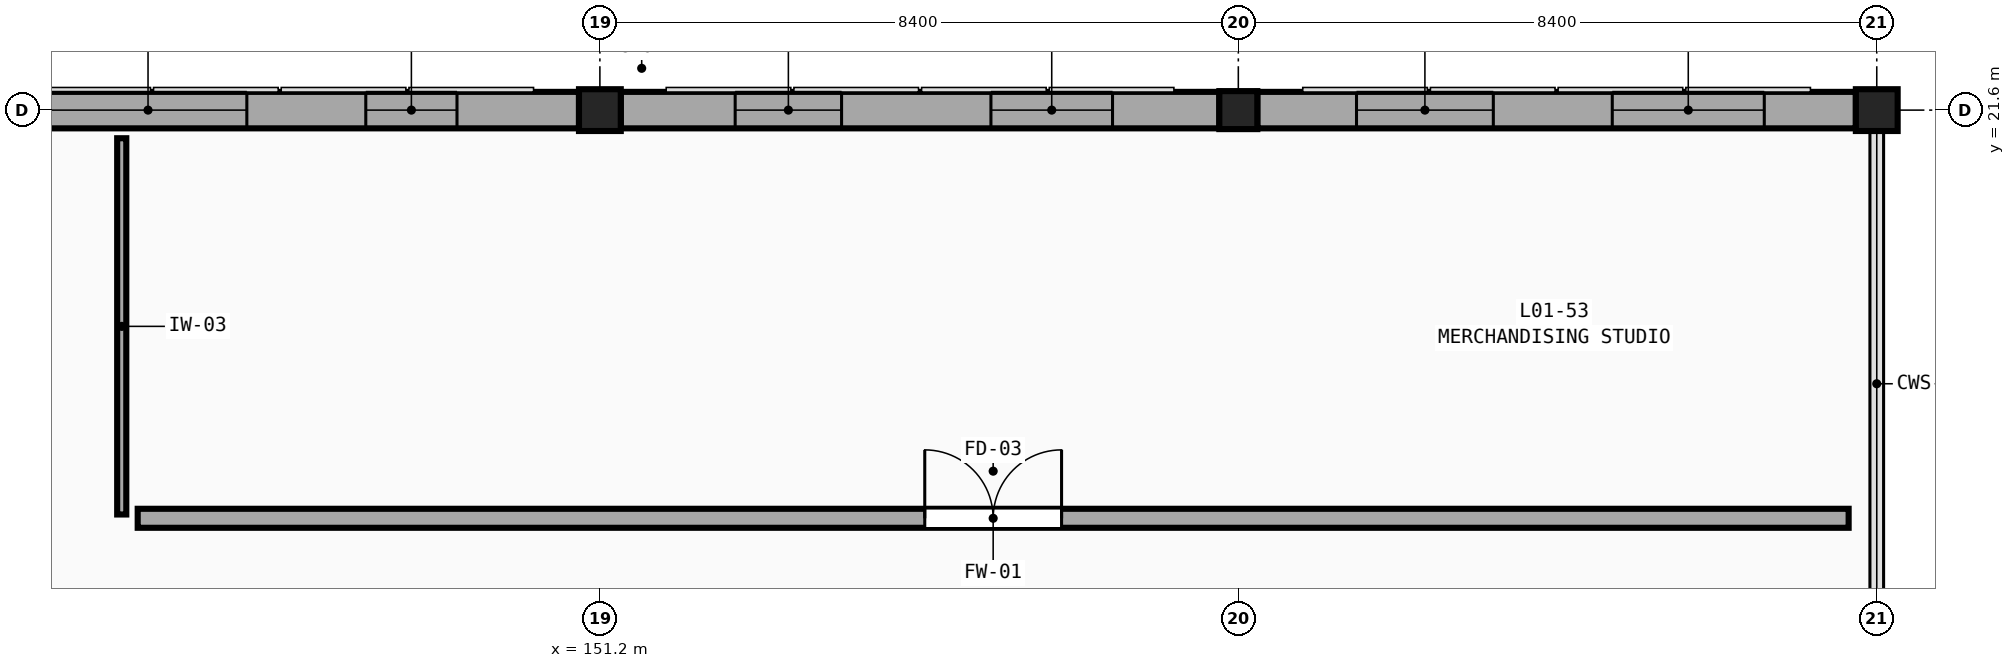
"""IFC4 building model, lengths in metres.
Left out: names, types, materials, properties, quantities, classifications, styles, units other than length and angle.
Written with IfcOpenShell. Run it as: python <this file> out.ifc"""

import sys

from ifc_helpers import new_model, si_unit, direction, frame, frame_2d, origin, origin_2d, place, context, subcontext, project, spatial, rectangle, extrude, element, fill, save


model = new_model("IFC4")
c1 = context("Model", 3, precision=1e-05, world=origin(), true_north=direction((0.0, 1.0)))
c2 = subcontext(c1, "Body", "Model", "MODEL_VIEW")
j1 = project(units=[si_unit("LENGTHUNIT", "METRE"), si_unit("PLANEANGLEUNIT", "RADIAN")], contexts=[c1])
p1 = place(None, origin())
s1 = spatial("IfcSite", under=j1, at=p1, CompositionType="ELEMENT")
p2 = place(p1, origin())
s2 = spatial("IfcBuilding", under=s1, at=p2, CompositionType="ELEMENT")
p3 = place(p2, frame((0.0, 0.0, 5.4)))
s3 = spatial("IfcBuildingStorey", under=s2, at=p3, CompositionType="ELEMENT", Elevation=5.4)
p4 = place(p3, frame((151.2, 21.6, 0.0), z_axis=(0.0, 0.0, 1.0), x_axis=(1.0, 0.0, 0.0)))
e1 = element("IfcColumn", 1, at=p4, inside=s3, PredefinedType="COLUMN", context=c2, shape_type="SweptSolid", body=[
    extrude(rectangle(XDim=0.55, YDim=0.55, at=origin_2d()), origin(), (0.0, 0.0, 1.0), 4.5),
])
p5 = place(p3, frame((159.6, 21.6, 0.0), z_axis=(0.0, 0.0, 1.0), x_axis=(1.0, 0.0, 0.0)))
e2 = element("IfcColumn", 2, at=p5, inside=s3, PredefinedType="COLUMN", context=c2, shape_type="SweptSolid", body=[
    extrude(rectangle(XDim=0.5, YDim=0.5, at=origin_2d()), origin(), (0.0, 0.0, 1.0), 4.5),
])
p6 = place(p3, frame((168.0, 21.6, 0.0), z_axis=(0.0, 0.0, 1.0), x_axis=(1.0, 0.0, 0.0)))
e3 = element("IfcColumn", 3, at=p6, inside=s3, PredefinedType="COLUMN", context=c2, shape_type="SweptSolid", body=[
    extrude(rectangle(XDim=0.55, YDim=0.55, at=origin_2d()), origin(), (0.0, 0.0, 1.0), 4.5),
])
p7 = place(p3, frame((143.05, 21.6, 0.0), z_axis=(0.0, 0.0, 1.0), x_axis=(1.0, 0.0, 0.0)))
e4 = element("IfcWall", 4, at=p7, inside=s3, PredefinedType="SOLIDWALL", context=c2, shape_type="SweptSolid", body=[
    extrude(rectangle(XDim=7.875, YDim=0.48, at=frame_2d((3.938, 0.0))), origin(), (0.0, 0.0, 1.0), 3.63),
])
p8 = place(p7, frame((0.905, 0.0, 0.75)))
e5 = element("IfcOpeningElement", 5, at=p8, cuts=e4, PredefinedType="OPENING", context=c2, shape_type="SweptSolid", body=[
    extrude(rectangle(XDim=2.6, YDim=2.08, at=frame_2d((1.3, 1.04))), frame((0.0, 0.26, 0.0), z_axis=(0.0, -1.0, 0.0), x_axis=(1.0, 0.0, 0.0)), (0.0, 0.0, 1.0), 0.52),
])
p9 = place(p7, frame((5.07, 0.0, 0.75)))
e6 = element("IfcOpeningElement", 6, at=p9, cuts=e4, PredefinedType="OPENING", context=c2, shape_type="SweptSolid", body=[
    extrude(rectangle(XDim=1.2, YDim=2.26, at=frame_2d((0.6, 1.13))), frame((0.0, 0.26, 0.0), z_axis=(0.0, -1.0, 0.0), x_axis=(1.0, 0.0, 0.0)), (0.0, 0.0, 1.0), 0.52),
])
p10 = place(p3, frame((151.475, 21.6, 0.0), z_axis=(0.0, 0.0, 1.0), x_axis=(1.0, 0.0, 0.0)))
e7 = element("IfcWall", 7, at=p10, inside=s3, PredefinedType="SOLIDWALL", context=c2, shape_type="SweptSolid", body=[
    extrude(rectangle(XDim=7.875, YDim=0.48, at=frame_2d((3.938, 0.0))), origin(), (0.0, 0.0, 1.0), 3.63),
])
p11 = place(p10, frame((1.505, 0.0, 0.75)))
e8 = element("IfcOpeningElement", 8, at=p11, cuts=e7, PredefinedType="OPENING", context=c2, shape_type="SweptSolid", body=[
    extrude(rectangle(XDim=1.4, YDim=2.26, at=frame_2d((0.7, 1.13))), frame((0.0, 0.26, 0.0), z_axis=(0.0, -1.0, 0.0), x_axis=(1.0, 0.0, 0.0)), (0.0, 0.0, 1.0), 0.52),
])
p12 = place(p10, frame((4.87, 0.0, 0.75)))
e9 = element("IfcOpeningElement", 9, at=p12, cuts=e7, PredefinedType="OPENING", context=c2, shape_type="SweptSolid", body=[
    extrude(rectangle(XDim=1.6, YDim=2.26, at=frame_2d((0.8, 1.13))), frame((0.0, 0.26, 0.0), z_axis=(0.0, -1.0, 0.0), x_axis=(1.0, 0.0, 0.0)), (0.0, 0.0, 1.0), 0.52),
])
p13 = place(p3, frame((159.85, 21.6, 0.0), z_axis=(0.0, 0.0, 1.0), x_axis=(1.0, 0.0, 0.0)))
e10 = element("IfcWall", 10, at=p13, inside=s3, PredefinedType="SOLIDWALL", context=c2, shape_type="SweptSolid", body=[
    extrude(rectangle(XDim=7.875, YDim=0.48, at=frame_2d((3.938, 0.0))), origin(), (0.0, 0.0, 1.0), 3.63),
])
p14 = place(p13, frame((1.305, 0.0, 0.75)))
e11 = element("IfcOpeningElement", 11, at=p14, cuts=e10, PredefinedType="OPENING", context=c2, shape_type="SweptSolid", body=[
    extrude(rectangle(XDim=1.8, YDim=2.26, at=frame_2d((0.9, 1.13))), frame((0.0, 0.26, 0.0), z_axis=(0.0, -1.0, 0.0), x_axis=(1.0, 0.0, 0.0)), (0.0, 0.0, 1.0), 0.52),
])
p15 = place(p13, frame((4.67, 0.0, 0.75)))
e12 = element("IfcOpeningElement", 12, at=p15, cuts=e10, PredefinedType="OPENING", context=c2, shape_type="SweptSolid", body=[
    extrude(rectangle(XDim=2.0, YDim=2.26, at=frame_2d((1.0, 1.13))), frame((0.0, 0.26, 0.0), z_axis=(0.0, -1.0, 0.0), x_axis=(1.0, 0.0, 0.0)), (0.0, 0.0, 1.0), 0.52),
])
p16 = place(p3, frame((145.119, 16.23, 0.0), z_axis=(0.0, 0.0, 1.0), x_axis=(1.0, 0.0, 0.0)))
e13 = element("IfcWall", 13, at=p16, inside=s3, PredefinedType="SOLIDWALL", context=c2, shape_type="SweptSolid", body=[
    extrude(rectangle(XDim=22.511, YDim=0.25, at=frame_2d((11.255, 0.0))), origin(), (0.0, 0.0, 1.0), 4.18),
])
p17 = place(p16, frame((10.355, 0.0, 0.0)))
e14 = element("IfcOpeningElement", 14, at=p17, cuts=e13, PredefinedType="OPENING", context=c2, shape_type="SweptSolid", body=[
    extrude(rectangle(XDim=1.8, YDim=2.3, at=frame_2d((0.9, 1.15))), frame((0.0, 0.145, 0.0), z_axis=(0.0, -1.0, 0.0), x_axis=(1.0, 0.0, 0.0)), (0.0, 0.0, 1.0), 0.29),
])
p18 = place(p3, frame((144.909, 16.28, 0.0), z_axis=(0.0, 0.0, 1.0), x_axis=(0.0, 1.0, 0.0)))
e15 = element("IfcWall", 15, at=p18, inside=s3, PredefinedType="PARTITIONING", context=c2, shape_type="SweptSolid", body=[
    extrude(rectangle(XDim=4.95, YDim=0.12, at=frame_2d((2.475, 0.0))), origin(), (0.0, 0.0, 1.0), 4.18),
])
p19 = place(p8, origin())
e16 = element("IfcWindow", 16, at=p19, inside=s3, PartitioningType="TRIPLE_PANEL_VERTICAL", PredefinedType="WINDOW", context=c2, shape_type="SweptSolid", body=[
    extrude(rectangle(XDim=2.6, YDim=2.08, at=frame_2d((1.3, 1.04))), frame((0.0, 0.03, 0.0), z_axis=(0.0, -1.0, 0.0), x_axis=(1.0, 0.0, 0.0)), (0.0, 0.0, 1.0), 0.06),
])
fill(e5, e16)
p20 = place(p9, origin())
e17 = element("IfcWindow", 17, at=p20, inside=s3, PartitioningType="SINGLE_PANEL", PredefinedType="WINDOW", context=c2, shape_type="SweptSolid", body=[
    extrude(rectangle(XDim=1.2, YDim=2.26, at=frame_2d((0.6, 1.13))), frame((0.0, 0.03, 0.0), z_axis=(0.0, -1.0, 0.0), x_axis=(1.0, 0.0, 0.0)), (0.0, 0.0, 1.0), 0.06),
])
fill(e6, e17)
p21 = place(p11, origin())
e18 = element("IfcWindow", 18, at=p21, inside=s3, PartitioningType="DOUBLE_PANEL_VERTICAL", PredefinedType="WINDOW", context=c2, shape_type="SweptSolid", body=[
    extrude(rectangle(XDim=1.4, YDim=2.26, at=frame_2d((0.7, 1.13))), frame((0.0, 0.03, 0.0), z_axis=(0.0, -1.0, 0.0), x_axis=(1.0, 0.0, 0.0)), (0.0, 0.0, 1.0), 0.06),
])
fill(e8, e18)
p22 = place(p12, origin())
e19 = element("IfcWindow", 19, at=p22, inside=s3, PartitioningType="DOUBLE_PANEL_VERTICAL", PredefinedType="WINDOW", context=c2, shape_type="SweptSolid", body=[
    extrude(rectangle(XDim=1.6, YDim=2.26, at=frame_2d((0.8, 1.13))), frame((0.0, 0.03, 0.0), z_axis=(0.0, -1.0, 0.0), x_axis=(1.0, 0.0, 0.0)), (0.0, 0.0, 1.0), 0.06),
])
fill(e9, e19)
p23 = place(p14, origin())
e20 = element("IfcWindow", 20, at=p23, inside=s3, PartitioningType="DOUBLE_PANEL_VERTICAL", PredefinedType="WINDOW", context=c2, shape_type="SweptSolid", body=[
    extrude(rectangle(XDim=1.8, YDim=2.26, at=frame_2d((0.9, 1.13))), frame((0.0, 0.03, 0.0), z_axis=(0.0, -1.0, 0.0), x_axis=(1.0, 0.0, 0.0)), (0.0, 0.0, 1.0), 0.06),
])
fill(e11, e20)
p24 = place(p15, origin())
e21 = element("IfcWindow", 21, at=p24, inside=s3, PartitioningType="TRIPLE_PANEL_VERTICAL", PredefinedType="WINDOW", context=c2, shape_type="SweptSolid", body=[
    extrude(rectangle(XDim=2.0, YDim=2.26, at=frame_2d((1.0, 1.13))), frame((0.0, 0.03, 0.0), z_axis=(0.0, -1.0, 0.0), x_axis=(1.0, 0.0, 0.0)), (0.0, 0.0, 1.0), 0.06),
])
fill(e12, e21)
p25 = place(p17, origin())
e22 = element("IfcDoor", 22, at=p25, inside=s3, OperationType="DOUBLE_DOOR_SINGLE_SWING", PredefinedType="DOOR", context=c2, shape_type="SweptSolid", body=[
    extrude(rectangle(XDim=1.8, YDim=2.3, at=frame_2d((0.9, 1.15))), frame((0.0, 0.025, 0.0), z_axis=(0.0, -1.0, 0.0), x_axis=(1.0, 0.0, 0.0)), (0.0, 0.0, 1.0), 0.05),
])
fill(e14, e22)
save(model, sys.argv[1])
